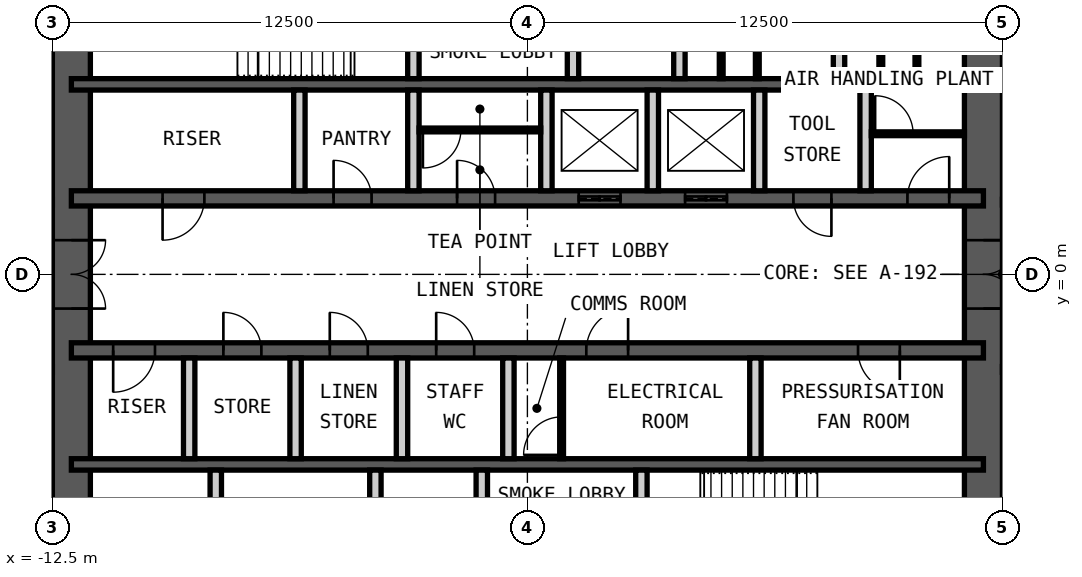
"""IFC4 building model, lengths in metres.
Left out: names, types, materials, properties, quantities, classifications, styles, units other than length and angle.
Written with IfcOpenShell. Run it as: python <this file> out.ifc"""

import sys

from ifc_helpers import new_model, si_unit, direction, frame, frame_2d, origin, place, context, subcontext, project, spatial, rectangle, extrude, element, fill, save


model = new_model("IFC4")
c1 = context("Model", 3, precision=1e-05, world=origin(), true_north=direction((0.0, 1.0)))
c2 = subcontext(c1, "Body", "Model", "MODEL_VIEW")
j1 = project(units=[si_unit("LENGTHUNIT", "METRE"), si_unit("PLANEANGLEUNIT", "RADIAN")], contexts=[c1])
p1 = place(None, origin())
s1 = spatial("IfcSite", under=j1, at=p1, CompositionType="ELEMENT")
p2 = place(p1, origin())
s2 = spatial("IfcBuilding", under=s1, at=p2, CompositionType="ELEMENT")
p3 = place(p2, frame((0.0, 0.0, 278.8)))
s3 = spatial("IfcBuildingStorey", under=s2, at=p3, CompositionType="ELEMENT", Elevation=278.8)
p4 = place(p3, frame((12.0, -9.0, 0.0), z_axis=(0.0, 0.0, 1.0), x_axis=(0.0, 1.0, 0.0)))
e1 = element("IfcWall", 1, at=p4, inside=s3, PredefinedType="SHEAR", context=c2, shape_type="SweptSolid", body=[
    extrude(rectangle(XDim=18.0, YDim=1.0, at=frame_2d((9.0, 0.0))), origin(), (0.0, 0.0, 1.0), 4.2),
])
p5 = place(p4, frame((8.1, 0.0, 0.0)))
e2 = element("IfcOpeningElement", 2, at=p5, cuts=e1, PredefinedType="OPENING", context=c2, shape_type="SweptSolid", body=[
    extrude(rectangle(XDim=1.8, YDim=2.1, at=frame_2d((0.9, 1.05))), frame((0.0, 0.51, 0.0), z_axis=(0.0, -1.0, 0.0), x_axis=(1.0, 0.0, 0.0)), (0.0, 0.0, 1.0), 1.02),
])
p6 = place(p3, frame((-12.0, -9.0, 0.0), z_axis=(0.0, 0.0, 1.0), x_axis=(0.0, 1.0, 0.0)))
e3 = element("IfcWall", 3, at=p6, inside=s3, PredefinedType="SHEAR", context=c2, shape_type="SweptSolid", body=[
    extrude(rectangle(XDim=18.0, YDim=1.0, at=frame_2d((9.0, 0.0))), origin(), (0.0, 0.0, 1.0), 4.2),
])
p7 = place(p6, frame((8.1, 0.0, 0.0)))
e4 = element("IfcOpeningElement", 4, at=p7, cuts=e3, PredefinedType="OPENING", context=c2, shape_type="SweptSolid", body=[
    extrude(rectangle(XDim=1.8, YDim=2.1, at=frame_2d((0.9, 1.05))), frame((0.0, 0.51, 0.0), z_axis=(0.0, -1.0, 0.0), x_axis=(1.0, 0.0, 0.0)), (0.0, 0.0, 1.0), 1.02),
])
p8 = place(p3, frame((-12.0, 5.0, 0.0), z_axis=(0.0, 0.0, 1.0), x_axis=(1.0, 0.0, 0.0)))
e5 = element("IfcWall", 5, at=p8, inside=s3, PredefinedType="SHEAR", context=c2, shape_type="SweptSolid", body=[
    extrude(rectangle(XDim=24.0, YDim=0.3, at=frame_2d((12.0, 0.0))), origin(), (0.0, 0.0, 1.0), 4.2),
])
p9 = place(p3, frame((-12.0, 2.0, 0.0), z_axis=(0.0, 0.0, 1.0), x_axis=(1.0, 0.0, 0.0)))
e6 = element("IfcWall", 6, at=p9, inside=s3, PredefinedType="SHEAR", context=c2, shape_type="SweptSolid", body=[
    extrude(rectangle(XDim=24.0, YDim=0.4, at=frame_2d((12.0, 0.0))), origin(), (0.0, 0.0, 1.0), 4.2),
])
p10 = place(p9, frame((2.4, 0.0, 0.0)))
e7 = element("IfcOpeningElement", 7, at=p10, cuts=e6, PredefinedType="OPENING", context=c2, shape_type="SweptSolid", body=[
    extrude(rectangle(XDim=1.1, YDim=2.1, at=frame_2d((0.55, 1.05))), frame((0.0, 0.21, 0.0), z_axis=(0.0, -1.0, 0.0), x_axis=(1.0, 0.0, 0.0)), (0.0, 0.0, 1.0), 0.42),
])
p11 = place(p9, frame((22.0, 0.0, 0.0)))
e8 = element("IfcOpeningElement", 8, at=p11, cuts=e6, PredefinedType="OPENING", context=c2, shape_type="SweptSolid", body=[
    extrude(rectangle(XDim=1.1, YDim=2.1, at=frame_2d((0.55, 1.05))), frame((0.0, 0.21, 0.0), z_axis=(0.0, -1.0, 0.0), x_axis=(1.0, 0.0, 0.0)), (0.0, 0.0, 1.0), 0.42),
])
p12 = place(p9, frame((10.15, 0.0, 0.0)))
e9 = element("IfcOpeningElement", 9, at=p12, cuts=e6, PredefinedType="OPENING", context=c2, shape_type="SweptSolid", body=[
    extrude(rectangle(XDim=1.0, YDim=2.1, at=frame_2d((0.5, 1.05))), frame((0.0, 0.21, 0.0), z_axis=(0.0, -1.0, 0.0), x_axis=(1.0, 0.0, 0.0)), (0.0, 0.0, 1.0), 0.42),
])
p13 = place(p9, frame((6.9, 0.0, 0.0)))
e10 = element("IfcOpeningElement", 10, at=p13, cuts=e6, PredefinedType="OPENING", context=c2, shape_type="SweptSolid", body=[
    extrude(rectangle(XDim=1.0, YDim=2.1, at=frame_2d((0.5, 1.05))), frame((0.0, 0.21, 0.0), z_axis=(0.0, -1.0, 0.0), x_axis=(1.0, 0.0, 0.0)), (0.0, 0.0, 1.0), 0.42),
])
p14 = place(p9, frame((13.35, 0.0, 0.0)))
e11 = element("IfcOpeningElement", 11, at=p14, cuts=e6, PredefinedType="OPENING", context=c2, shape_type="SweptSolid", body=[
    extrude(rectangle(XDim=1.1, YDim=2.4, at=frame_2d((0.55, 1.2))), frame((0.0, 0.21, 0.0), z_axis=(0.0, -1.0, 0.0), x_axis=(1.0, 0.0, 0.0)), (0.0, 0.0, 1.0), 0.42),
])
p15 = place(p9, frame((16.15, 0.0, 0.0)))
e12 = element("IfcOpeningElement", 12, at=p15, cuts=e6, PredefinedType="OPENING", context=c2, shape_type="SweptSolid", body=[
    extrude(rectangle(XDim=1.1, YDim=2.4, at=frame_2d((0.55, 1.2))), frame((0.0, 0.21, 0.0), z_axis=(0.0, -1.0, 0.0), x_axis=(1.0, 0.0, 0.0)), (0.0, 0.0, 1.0), 0.42),
])
p16 = place(p9, frame((19.0, 0.0, 0.0)))
e13 = element("IfcOpeningElement", 13, at=p16, cuts=e6, PredefinedType="OPENING", context=c2, shape_type="SweptSolid", body=[
    extrude(rectangle(XDim=1.0, YDim=2.1, at=frame_2d((0.5, 1.05))), frame((0.0, 0.21, 0.0), z_axis=(0.0, -1.0, 0.0), x_axis=(1.0, 0.0, 0.0)), (0.0, 0.0, 1.0), 0.42),
])
p17 = place(p3, frame((-12.0, -2.0, 0.0), z_axis=(0.0, 0.0, 1.0), x_axis=(1.0, 0.0, 0.0)))
e14 = element("IfcWall", 14, at=p17, inside=s3, PredefinedType="SHEAR", context=c2, shape_type="SweptSolid", body=[
    extrude(rectangle(XDim=24.0, YDim=0.4, at=frame_2d((12.0, 0.0))), origin(), (0.0, 0.0, 1.0), 4.2),
])
p18 = place(p17, frame((1.1, 0.0, 0.0)))
e15 = element("IfcOpeningElement", 15, at=p18, cuts=e14, PredefinedType="OPENING", context=c2, shape_type="SweptSolid", body=[
    extrude(rectangle(XDim=1.1, YDim=2.1, at=frame_2d((0.55, 1.05))), frame((0.0, 0.21, 0.0), z_axis=(0.0, -1.0, 0.0), x_axis=(1.0, 0.0, 0.0)), (0.0, 0.0, 1.0), 0.42),
])
p19 = place(p17, frame((13.55, 0.0, 0.0)))
e16 = element("IfcOpeningElement", 16, at=p19, cuts=e14, PredefinedType="OPENING", context=c2, shape_type="SweptSolid", body=[
    extrude(rectangle(XDim=1.1, YDim=2.1, at=frame_2d((0.55, 1.05))), frame((0.0, 0.21, 0.0), z_axis=(0.0, -1.0, 0.0), x_axis=(1.0, 0.0, 0.0)), (0.0, 0.0, 1.0), 0.42),
])
p20 = place(p17, frame((20.7, 0.0, 0.0)))
e17 = element("IfcOpeningElement", 17, at=p20, cuts=e14, PredefinedType="OPENING", context=c2, shape_type="SweptSolid", body=[
    extrude(rectangle(XDim=1.1, YDim=2.1, at=frame_2d((0.55, 1.05))), frame((0.0, 0.21, 0.0), z_axis=(0.0, -1.0, 0.0), x_axis=(1.0, 0.0, 0.0)), (0.0, 0.0, 1.0), 0.42),
])
p21 = place(p17, frame((4.0, 0.0, 0.0)))
e18 = element("IfcOpeningElement", 18, at=p21, cuts=e14, PredefinedType="OPENING", context=c2, shape_type="SweptSolid", body=[
    extrude(rectangle(XDim=1.0, YDim=2.1, at=frame_2d((0.5, 1.05))), frame((0.0, 0.21, 0.0), z_axis=(0.0, -1.0, 0.0), x_axis=(1.0, 0.0, 0.0)), (0.0, 0.0, 1.0), 0.42),
])
p22 = place(p17, frame((6.8, 0.0, 0.0)))
e19 = element("IfcOpeningElement", 19, at=p22, cuts=e14, PredefinedType="OPENING", context=c2, shape_type="SweptSolid", body=[
    extrude(rectangle(XDim=1.0, YDim=2.1, at=frame_2d((0.5, 1.05))), frame((0.0, 0.21, 0.0), z_axis=(0.0, -1.0, 0.0), x_axis=(1.0, 0.0, 0.0)), (0.0, 0.0, 1.0), 0.42),
])
p23 = place(p17, frame((9.6, 0.0, 0.0)))
e20 = element("IfcOpeningElement", 20, at=p23, cuts=e14, PredefinedType="OPENING", context=c2, shape_type="SweptSolid", body=[
    extrude(rectangle(XDim=1.0, YDim=2.1, at=frame_2d((0.5, 1.05))), frame((0.0, 0.21, 0.0), z_axis=(0.0, -1.0, 0.0), x_axis=(1.0, 0.0, 0.0)), (0.0, 0.0, 1.0), 0.42),
])
p24 = place(p3, frame((-12.0, -5.0, 0.0), z_axis=(0.0, 0.0, 1.0), x_axis=(1.0, 0.0, 0.0)))
e21 = element("IfcWall", 21, at=p24, inside=s3, PredefinedType="SHEAR", context=c2, shape_type="SweptSolid", body=[
    extrude(rectangle(XDim=24.0, YDim=0.3, at=frame_2d((12.0, 0.0))), origin(), (0.0, 0.0, 1.0), 4.2),
])
p25 = place(p3, frame((-3.0, 5.15, 0.0), z_axis=(0.0, 0.0, 1.0), x_axis=(0.0, 1.0, 0.0)))
e22 = element("IfcWall", 22, at=p25, inside=s3, PredefinedType="PARTITIONING", context=c2, shape_type="SweptSolid", body=[
    extrude(rectangle(XDim=3.85, YDim=0.3, at=frame_2d((1.925, 0.0))), origin(), (0.0, 0.0, 1.0), 3.98),
])
p26 = place(p25, frame((1.425, 0.0, 0.0)))
e23 = element("IfcOpeningElement", 23, at=p26, cuts=e22, PredefinedType="OPENING", context=c2, shape_type="SweptSolid", body=[
    extrude(rectangle(XDim=1.0, YDim=2.1, at=frame_2d((0.5, 1.05))), frame((0.0, 0.16, 0.0), z_axis=(0.0, -1.0, 0.0), x_axis=(1.0, 0.0, 0.0)), (0.0, 0.0, 1.0), 0.32),
])
p27 = place(p3, frame((1.2, 5.15, 0.0), z_axis=(0.0, 0.0, 1.0), x_axis=(0.0, 1.0, 0.0)))
e24 = element("IfcWall", 24, at=p27, inside=s3, PredefinedType="PARTITIONING", context=c2, shape_type="SweptSolid", body=[
    extrude(rectangle(XDim=3.85, YDim=0.3, at=frame_2d((1.925, 0.0))), origin(), (0.0, 0.0, 1.0), 3.98),
])
p28 = place(p27, frame((1.375, 0.0, 0.0)))
e25 = element("IfcOpeningElement", 25, at=p28, cuts=e24, PredefinedType="OPENING", context=c2, shape_type="SweptSolid", body=[
    extrude(rectangle(XDim=1.1, YDim=2.4, at=frame_2d((0.55, 1.2))), frame((0.0, 0.16, 0.0), z_axis=(0.0, -1.0, 0.0), x_axis=(1.0, 0.0, 0.0)), (0.0, 0.0, 1.0), 0.32),
])
for number, where, z_axis, x_axis in (
    (26, (4.0, 5.15, 0.0), (0.0, 0.0, 1.0), (0.0, 1.0, 0.0)),
    (27, (8.2, 5.15, 0.0), (0.0, 0.0, 1.0), (0.0, 1.0, 0.0)),
):
    element("IfcWall", number, at=place(p3, frame(where, z_axis=z_axis, x_axis=x_axis)), inside=s3, PredefinedType="PARTITIONING", context=c2, shape_type="SweptSolid", body=[
        extrude(rectangle(XDim=3.85, YDim=0.3, at=frame_2d((1.925, 0.0))), origin(), (0.0, 0.0, 1.0), 3.98),
    ])
for number, where, z_axis, x_axis in (
    (28, (-6.0, 2.2, 0.0), (0.0, 0.0, 1.0), (0.0, 1.0, 0.0)),
    (29, (-3.0, 2.2, 0.0), (0.0, 0.0, 1.0), (0.0, 1.0, 0.0)),
    (30, (0.5, 2.2, 0.0), (0.0, 0.0, 1.0), (0.0, 1.0, 0.0)),
    (31, (3.3, 2.2, 0.0), (0.0, 0.0, 1.0), (0.0, 1.0, 0.0)),
    (32, (6.1, 2.2, 0.0), (0.0, 0.0, 1.0), (0.0, 1.0, 0.0)),
    (33, (8.9, 2.2, 0.0), (0.0, 0.0, 1.0), (0.0, 1.0, 0.0)),
    (34, (-8.9, -4.85, 0.0), (0.0, 0.0, 1.0), (0.0, 1.0, 0.0)),
    (35, (-6.1, -4.85, 0.0), (0.0, 0.0, 1.0), (0.0, 1.0, 0.0)),
    (36, (-3.3, -4.85, 0.0), (0.0, 0.0, 1.0), (0.0, 1.0, 0.0)),
    (37, (-0.5, -4.85, 0.0), (0.0, 0.0, 1.0), (0.0, 1.0, 0.0)),
    (38, (6.0, -4.85, 0.0), (0.0, 0.0, 1.0), (0.0, 1.0, 0.0)),
):
    element("IfcWall", number, at=place(p3, frame(where, z_axis=z_axis, x_axis=x_axis)), inside=s3, PredefinedType="PARTITIONING", context=c2, shape_type="SweptSolid", body=[
        extrude(rectangle(XDim=2.65, YDim=0.3, at=frame_2d((1.325, 0.0))), origin(), (0.0, 0.0, 1.0), 3.98),
    ])
for number, where, z_axis, x_axis in (
    (39, (-8.2, -9.0, 0.0), (0.0, 0.0, 1.0), (0.0, 1.0, 0.0)),
    (40, (-4.0, -9.0, 0.0), (0.0, 0.0, 1.0), (0.0, 1.0, 0.0)),
):
    element("IfcWall", number, at=place(p3, frame(where, z_axis=z_axis, x_axis=x_axis)), inside=s3, PredefinedType="PARTITIONING", context=c2, shape_type="SweptSolid", body=[
        extrude(rectangle(XDim=3.85, YDim=0.3, at=frame_2d((1.925, 0.0))), origin(), (0.0, 0.0, 1.0), 3.98),
    ])
p29 = place(p3, frame((-1.2, -9.0, 0.0), z_axis=(0.0, 0.0, 1.0), x_axis=(0.0, 1.0, 0.0)))
e41 = element("IfcWall", 41, at=p29, inside=s3, PredefinedType="PARTITIONING", context=c2, shape_type="SweptSolid", body=[
    extrude(rectangle(XDim=3.85, YDim=0.3, at=frame_2d((1.925, 0.0))), origin(), (0.0, 0.0, 1.0), 3.98),
])
p30 = place(p29, frame((1.375, 0.0, 0.0)))
e42 = element("IfcOpeningElement", 42, at=p30, cuts=e41, PredefinedType="OPENING", context=c2, shape_type="SweptSolid", body=[
    extrude(rectangle(XDim=1.1, YDim=2.4, at=frame_2d((0.55, 1.2))), frame((0.0, 0.16, 0.0), z_axis=(0.0, -1.0, 0.0), x_axis=(1.0, 0.0, 0.0)), (0.0, 0.0, 1.0), 0.32),
])
p31 = place(p3, frame((3.0, -9.0, 0.0), z_axis=(0.0, 0.0, 1.0), x_axis=(0.0, 1.0, 0.0)))
e43 = element("IfcWall", 43, at=p31, inside=s3, PredefinedType="PARTITIONING", context=c2, shape_type="SweptSolid", body=[
    extrude(rectangle(XDim=3.85, YDim=0.3, at=frame_2d((1.925, 0.0))), origin(), (0.0, 0.0, 1.0), 3.98),
])
p32 = place(p31, frame((1.425, 0.0, 0.0)))
e44 = element("IfcOpeningElement", 44, at=p32, cuts=e43, PredefinedType="OPENING", context=c2, shape_type="SweptSolid", body=[
    extrude(rectangle(XDim=1.0, YDim=2.1, at=frame_2d((0.5, 1.05))), frame((0.0, 0.16, 0.0), z_axis=(0.0, -1.0, 0.0), x_axis=(1.0, 0.0, 0.0)), (0.0, 0.0, 1.0), 0.32),
])
p33 = place(p3, frame((-2.85, 3.8, 0.0), z_axis=(0.0, 0.0, 1.0), x_axis=(1.0, 0.0, 0.0)))
e45 = element("IfcWall", 45, at=p33, inside=s3, PredefinedType="PARTITIONING", context=c2, shape_type="SweptSolid", body=[
    extrude(rectangle(XDim=3.2, YDim=0.1, at=frame_2d((1.6, 0.0))), origin(), (0.0, 0.0, 1.0), 3.98),
])
p34 = place(p33, frame((0.1, 0.0, 0.0)))
e46 = element("IfcOpeningElement", 46, at=p34, cuts=e45, PredefinedType="OPENING", context=c2, shape_type="SweptSolid", body=[
    extrude(rectangle(XDim=1.0, YDim=2.4, at=frame_2d((0.5, 1.2))), frame((0.0, 0.06, 0.0), z_axis=(0.0, -1.0, 0.0), x_axis=(1.0, 0.0, 0.0)), (0.0, 0.0, 1.0), 0.12),
])
p35 = place(p3, frame((0.9, -4.85, 0.0), z_axis=(0.0, 0.0, 1.0), x_axis=(0.0, 1.0, 0.0)))
e47 = element("IfcWall", 47, at=p35, inside=s3, PredefinedType="PARTITIONING", context=c2, shape_type="SweptSolid", body=[
    extrude(rectangle(XDim=2.65, YDim=0.1, at=frame_2d((1.325, 0.0))), origin(), (0.0, 0.0, 1.0), 3.98),
])
p36 = place(p35, frame((0.1, 0.0, 0.0)))
e48 = element("IfcOpeningElement", 48, at=p36, cuts=e47, PredefinedType="OPENING", context=c2, shape_type="SweptSolid", body=[
    extrude(rectangle(XDim=1.0, YDim=2.4, at=frame_2d((0.5, 1.2))), frame((0.0, 0.06, 0.0), z_axis=(0.0, -1.0, 0.0), x_axis=(1.0, 0.0, 0.0)), (0.0, 0.0, 1.0), 0.12),
])
p37 = place(p3, frame((9.05, 3.7, 0.0), z_axis=(0.0, 0.0, 1.0), x_axis=(1.0, 0.0, 0.0)))
e49 = element("IfcWall", 49, at=p37, inside=s3, PredefinedType="PARTITIONING", context=c2, shape_type="SweptSolid", body=[
    extrude(rectangle(XDim=2.45, YDim=0.1, at=frame_2d((1.225, 0.0))), origin(), (0.0, 0.0, 1.0), 3.98),
])
p38 = place(p37, frame((0.1, 0.0, 0.0)))
e50 = element("IfcOpeningElement", 50, at=p38, cuts=e49, PredefinedType="OPENING", context=c2, shape_type="SweptSolid", body=[
    extrude(rectangle(XDim=1.0, YDim=2.4, at=frame_2d((0.5, 1.2))), frame((0.0, 0.06, 0.0), z_axis=(0.0, -1.0, 0.0), x_axis=(1.0, 0.0, 0.0)), (0.0, 0.0, 1.0), 0.12),
])
for number, where, z_axis, x_axis in (
    (51, (5.1, 5.15, 0.0), (0.0, 0.0, 1.0), (0.0, 1.0, 0.0)),
    (52, (6.05, 5.15, 0.0), (0.0, 0.0, 1.0), (0.0, 1.0, 0.0)),
    (53, (9.3, 5.15, 0.0), (0.0, 0.0, 1.0), (0.0, 1.0, 0.0)),
    (54, (10.25, 5.15, 0.0), (0.0, 0.0, 1.0), (0.0, 1.0, 0.0)),
):
    element("IfcWall", number, at=place(p3, frame(where, z_axis=z_axis, x_axis=x_axis)), inside=s3, PredefinedType="PARTITIONING", context=c2, shape_type="SweptSolid", body=[
        extrude(rectangle(XDim=1.5, YDim=0.1, at=frame_2d((0.75, 0.0))), origin(), (0.0, 0.0, 1.0), 2.1),
    ])
p39 = place(p10, origin())
e55 = element("IfcDoor", 55, at=p39, inside=s3, OperationType="SINGLE_SWING_LEFT", PredefinedType="DOOR", context=c2, shape_type="SweptSolid", body=[
    extrude(rectangle(XDim=1.1, YDim=2.1, at=frame_2d((0.55, 1.05))), frame((0.0, 0.025, 0.0), z_axis=(0.0, -1.0, 0.0), x_axis=(1.0, 0.0, 0.0)), (0.0, 0.0, 1.0), 0.05),
])
fill(e7, e55)
p40 = place(p18, origin())
e56 = element("IfcDoor", 56, at=p40, inside=s3, OperationType="SINGLE_SWING_LEFT", PredefinedType="DOOR", context=c2, shape_type="SweptSolid", body=[
    extrude(rectangle(XDim=1.1, YDim=2.1, at=frame_2d((0.55, 1.05))), frame((0.0, 0.025, 0.0), z_axis=(0.0, -1.0, 0.0), x_axis=(1.0, 0.0, 0.0)), (0.0, 0.0, 1.0), 0.05),
])
fill(e15, e56)
p41 = place(p11, origin())
e57 = element("IfcDoor", 57, at=p41, inside=s3, OperationType="SINGLE_SWING_LEFT", PredefinedType="DOOR", context=c2, shape_type="SweptSolid", body=[
    extrude(rectangle(XDim=1.1, YDim=2.1, at=frame_2d((0.55, 1.05))), frame((0.0, 0.025, 0.0), z_axis=(0.0, -1.0, 0.0), x_axis=(1.0, 0.0, 0.0)), (0.0, 0.0, 1.0), 0.05),
])
fill(e8, e57)
p42 = place(p12, origin())
e58 = element("IfcDoor", 58, at=p42, inside=s3, OperationType="SINGLE_SWING_RIGHT", PredefinedType="DOOR", context=c2, shape_type="SweptSolid", body=[
    extrude(rectangle(XDim=1.0, YDim=2.1, at=frame_2d((0.5, 1.05))), frame((0.0, 0.025, 0.0), z_axis=(0.0, -1.0, 0.0), x_axis=(1.0, 0.0, 0.0)), (0.0, 0.0, 1.0), 0.05),
])
fill(e9, e58)
p43 = place(p19, origin())
e59 = element("IfcDoor", 59, at=p43, inside=s3, OperationType="SINGLE_SWING_LEFT", PredefinedType="DOOR", context=c2, shape_type="SweptSolid", body=[
    extrude(rectangle(XDim=1.1, YDim=2.1, at=frame_2d((0.55, 1.05))), frame((0.0, 0.025, 0.0), z_axis=(0.0, -1.0, 0.0), x_axis=(1.0, 0.0, 0.0)), (0.0, 0.0, 1.0), 0.05),
])
fill(e16, e59)
p44 = place(p20, origin())
e60 = element("IfcDoor", 60, at=p44, inside=s3, OperationType="SINGLE_SWING_RIGHT", PredefinedType="DOOR", context=c2, shape_type="SweptSolid", body=[
    extrude(rectangle(XDim=1.1, YDim=2.1, at=frame_2d((0.55, 1.05))), frame((0.0, 0.025, 0.0), z_axis=(0.0, -1.0, 0.0), x_axis=(1.0, 0.0, 0.0)), (0.0, 0.0, 1.0), 0.05),
])
fill(e17, e60)
p45 = place(p5, origin())
e61 = element("IfcDoor", 61, at=p45, inside=s3, OperationType="DOUBLE_DOOR_DOUBLE_SWING", PredefinedType="DOOR", context=c2, shape_type="SweptSolid", body=[
    extrude(rectangle(XDim=1.8, YDim=2.1, at=frame_2d((0.9, 1.05))), frame((0.0, 0.025, 0.0), z_axis=(0.0, -1.0, 0.0), x_axis=(1.0, 0.0, 0.0)), (0.0, 0.0, 1.0), 0.05),
])
fill(e2, e61)
p46 = place(p7, origin())
e62 = element("IfcDoor", 62, at=p46, inside=s3, OperationType="DOUBLE_DOOR_DOUBLE_SWING", PredefinedType="DOOR", context=c2, shape_type="SweptSolid", body=[
    extrude(rectangle(XDim=1.8, YDim=2.1, at=frame_2d((0.9, 1.05))), frame((0.0, 0.025, 0.0), z_axis=(0.0, -1.0, 0.0), x_axis=(1.0, 0.0, 0.0)), (0.0, 0.0, 1.0), 0.05),
])
fill(e4, e62)
p47 = place(p13, origin())
e63 = element("IfcDoor", 63, at=p47, inside=s3, OperationType="SINGLE_SWING_RIGHT", PredefinedType="DOOR", context=c2, shape_type="SweptSolid", body=[
    extrude(rectangle(XDim=1.0, YDim=2.1, at=frame_2d((0.5, 1.05))), frame((0.0, 0.025, 0.0), z_axis=(0.0, -1.0, 0.0), x_axis=(1.0, 0.0, 0.0)), (0.0, 0.0, 1.0), 0.05),
])
fill(e10, e63)
p48 = place(p14, origin())
e64 = element("IfcDoor", 64, at=p48, inside=s3, OperationType="DOUBLE_DOOR_SLIDING", PredefinedType="DOOR", context=c2, shape_type="SweptSolid", body=[
    extrude(rectangle(XDim=1.1, YDim=2.4, at=frame_2d((0.55, 1.2))), frame((0.0, 0.025, 0.0), z_axis=(0.0, -1.0, 0.0), x_axis=(1.0, 0.0, 0.0)), (0.0, 0.0, 1.0), 0.05),
])
fill(e11, e64)
p49 = place(p15, origin())
e65 = element("IfcDoor", 65, at=p49, inside=s3, OperationType="DOUBLE_DOOR_SLIDING", PredefinedType="DOOR", context=c2, shape_type="SweptSolid", body=[
    extrude(rectangle(XDim=1.1, YDim=2.4, at=frame_2d((0.55, 1.2))), frame((0.0, 0.025, 0.0), z_axis=(0.0, -1.0, 0.0), x_axis=(1.0, 0.0, 0.0)), (0.0, 0.0, 1.0), 0.05),
])
fill(e12, e65)
p50 = place(p16, origin())
e66 = element("IfcDoor", 66, at=p50, inside=s3, OperationType="SINGLE_SWING_RIGHT", PredefinedType="DOOR", context=c2, shape_type="SweptSolid", body=[
    extrude(rectangle(XDim=1.0, YDim=2.1, at=frame_2d((0.5, 1.05))), frame((0.0, 0.025, 0.0), z_axis=(0.0, -1.0, 0.0), x_axis=(1.0, 0.0, 0.0)), (0.0, 0.0, 1.0), 0.05),
])
fill(e13, e66)
p51 = place(p21, origin())
e67 = element("IfcDoor", 67, at=p51, inside=s3, OperationType="SINGLE_SWING_RIGHT", PredefinedType="DOOR", context=c2, shape_type="SweptSolid", body=[
    extrude(rectangle(XDim=1.0, YDim=2.1, at=frame_2d((0.5, 1.05))), frame((0.0, 0.025, 0.0), z_axis=(0.0, -1.0, 0.0), x_axis=(1.0, 0.0, 0.0)), (0.0, 0.0, 1.0), 0.05),
])
fill(e18, e67)
p52 = place(p22, origin())
e68 = element("IfcDoor", 68, at=p52, inside=s3, OperationType="SINGLE_SWING_RIGHT", PredefinedType="DOOR", context=c2, shape_type="SweptSolid", body=[
    extrude(rectangle(XDim=1.0, YDim=2.1, at=frame_2d((0.5, 1.05))), frame((0.0, 0.025, 0.0), z_axis=(0.0, -1.0, 0.0), x_axis=(1.0, 0.0, 0.0)), (0.0, 0.0, 1.0), 0.05),
])
fill(e19, e68)
p53 = place(p23, origin())
e69 = element("IfcDoor", 69, at=p53, inside=s3, OperationType="SINGLE_SWING_RIGHT", PredefinedType="DOOR", context=c2, shape_type="SweptSolid", body=[
    extrude(rectangle(XDim=1.0, YDim=2.1, at=frame_2d((0.5, 1.05))), frame((0.0, 0.025, 0.0), z_axis=(0.0, -1.0, 0.0), x_axis=(1.0, 0.0, 0.0)), (0.0, 0.0, 1.0), 0.05),
])
fill(e20, e69)
p54 = place(p34, origin())
e70 = element("IfcDoor", 70, at=p54, inside=s3, OperationType="SINGLE_SWING_LEFT", PredefinedType="DOOR", context=c2, shape_type="SweptSolid", body=[
    extrude(rectangle(XDim=1.0, YDim=2.4, at=frame_2d((0.5, 1.2))), frame((0.0, 0.025, 0.0), z_axis=(0.0, -1.0, 0.0), x_axis=(1.0, 0.0, 0.0)), (0.0, 0.0, 1.0), 0.05),
])
fill(e46, e70)
p55 = place(p36, origin())
e71 = element("IfcDoor", 71, at=p55, inside=s3, OperationType="SINGLE_SWING_RIGHT", PredefinedType="DOOR", context=c2, shape_type="SweptSolid", body=[
    extrude(rectangle(XDim=1.0, YDim=2.4, at=frame_2d((0.5, 1.2))), frame((0.0, 0.025, 0.0), z_axis=(0.0, -1.0, 0.0), x_axis=(1.0, 0.0, 0.0)), (0.0, 0.0, 1.0), 0.05),
])
fill(e48, e71)
p56 = place(p38, origin())
e72 = element("IfcDoor", 72, at=p56, inside=s3, OperationType="SINGLE_SWING_RIGHT", PredefinedType="DOOR", context=c2, shape_type="SweptSolid", body=[
    extrude(rectangle(XDim=1.0, YDim=2.4, at=frame_2d((0.5, 1.2))), frame((0.0, 0.025, 0.0), z_axis=(0.0, -1.0, 0.0), x_axis=(1.0, 0.0, 0.0)), (0.0, 0.0, 1.0), 0.05),
])
fill(e50, e72)
save(model, sys.argv[1])
